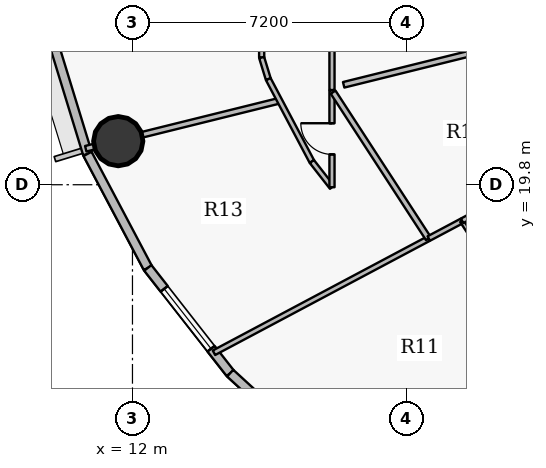
"""IFC4 building model, lengths in metres.
Left out: names, types, materials, properties, quantities, classifications, styles, units other than length and angle.
Written with IfcOpenShell. Run it as: python <this file> out.ifc"""

import sys

from ifc_helpers import new_model, si_unit, direction, frame, frame_2d, origin, origin_2d, place, context, subcontext, project, spatial, rectangle, hollow_circle, extrude, source, transform, mapped, element, fill, save


model = new_model("IFC4")
c1 = context("Model", 3, precision=1e-05, world=origin(), true_north=direction((0.0, 1.0)))
c2 = subcontext(c1, "Body", "Model", "MODEL_VIEW")
j1 = project(units=[si_unit("LENGTHUNIT", "METRE"), si_unit("PLANEANGLEUNIT", "RADIAN")], contexts=[c1])
p1 = place(None, origin())
s1 = spatial("IfcSite", under=j1, at=p1, CompositionType="ELEMENT")
p2 = place(p1, origin())
s2 = spatial("IfcBuilding", under=s1, at=p2, CompositionType="ELEMENT")
p3 = place(p2, frame((0.0, 0.0, 201.15)))
s3 = spatial("IfcBuildingStorey", under=s2, at=p3, CompositionType="ELEMENT", Elevation=201.15)
p4 = place(p3, frame((11.625, 20.947, 0.0), z_axis=(0.0, 0.0, 1.0), x_axis=(1.0, 0.0, 0.0)))
e1 = element("IfcColumn", 1, at=p4, inside=s3, PredefinedType="COLUMN", context=c2, shape_type="SweptSolid", body=[
    extrude(hollow_circle(Radius=0.65, WallThickness=0.04, at=origin_2d()), origin(), (0.0, 0.0, 1.0), 3.75),
])
p5 = place(p3, frame((10.817, 20.611, 0.0), z_axis=(0.0, 0.0, 1.0), x_axis=(-0.293097995113, 0.956082405058, 0.0)))
e2 = element("IfcWall", 2, at=p5, inside=s3, PredefinedType="SOLIDWALL", context=c2, shape_type="SweptSolid", body=[
    extrude(rectangle(XDim=3.3, YDim=0.24, at=frame_2d((1.65, 0.0))), origin(), (0.0, 0.0, 1.0), 3.45),
])
p6 = place(p3, frame((12.404, 17.612, 0.0), z_axis=(0.0, 0.0, 1.0), x_axis=(-0.467586874938, 0.88394712194, 0.0)))
e3 = element("IfcWall", 3, at=p6, inside=s3, PredefinedType="SOLIDWALL", context=c2, shape_type="SweptSolid", body=[
    extrude(rectangle(XDim=3.393, YDim=0.24, at=frame_2d((1.697, 0.0))), origin(), (0.0, 0.0, 1.0), 3.45),
])
p7 = place(p3, frame((14.572, 14.842, 0.0), z_axis=(0.0, 0.0, 1.0), x_axis=(-0.616287674549, 0.787521112224, 0.0)))
e4 = element("IfcWall", 4, at=p7, inside=s3, PredefinedType="SOLIDWALL", context=c2, shape_type="SweptSolid", body=[
    extrude(rectangle(XDim=3.517, YDim=0.24, at=frame_2d((1.759, 0.0))), origin(), (0.0, 0.0, 1.0), 3.45),
])
p8 = place(p7, frame((0.819, 0.0, 0.9)))
e5 = element("IfcOpeningElement", 5, at=p8, cuts=e4, PredefinedType="OPENING", context=c2, shape_type="SweptSolid", body=[
    extrude(rectangle(XDim=2.0, YDim=1.75, at=origin_2d()), frame((1.0, 0.13, 0.875), z_axis=(0.0, -1.0, 0.0), x_axis=(1.0, 0.0, 0.0)), (0.0, 0.0, 1.0), 0.26),
])
p9 = place(p3, frame((17.268, 12.369, 0.0), z_axis=(0.0, 0.0, 1.0), x_axis=(-0.737076565834, 0.675809245349, 0.0)))
e6 = element("IfcWall", 6, at=p9, inside=s3, PredefinedType="SOLIDWALL", context=c2, shape_type="SweptSolid", body=[
    extrude(rectangle(XDim=3.658, YDim=0.24, at=frame_2d((1.829, 0.0))), origin(), (0.0, 0.0, 1.0), 3.45),
])
p10 = place(p9, frame((1.204, 0.0, 0.9)))
e7 = element("IfcOpeningElement", 7, at=p10, cuts=e6, PredefinedType="OPENING", context=c2, shape_type="SweptSolid", body=[
    extrude(rectangle(XDim=1.25, YDim=1.65, at=origin_2d()), frame((0.625, 0.13, 0.825), z_axis=(0.0, -1.0, 0.0), x_axis=(1.0, 0.0, 0.0)), (0.0, 0.0, 1.0), 0.26),
])
p11 = place(p3, frame((10.771, 20.747, 0.0), z_axis=(0.0, 0.0, 1.0), x_axis=(0.970640303721, 0.240535653891, 0.0)))
e8 = element("IfcWall", 8, at=p11, inside=s3, PredefinedType="PARTITIONING", context=c2, shape_type="SweptSolid", body=[
    extrude(rectangle(XDim=5.258, YDim=0.15, at=frame_2d((2.629, 0.0))), origin(), (0.0, 0.0, 1.0), 2.885),
])
p12 = place(p3, frame((14.145, 15.379, 0.0), z_axis=(0.0, 0.0, 1.0), x_axis=(0.882932689309, 0.469499591214, 0.0)))
e9 = element("IfcWall", 9, at=p12, inside=s3, PredefinedType="PARTITIONING", context=c2, shape_type="SweptSolid", body=[
    extrude(rectangle(XDim=6.392, YDim=0.135, at=frame_2d((3.196, 0.0))), origin(), (0.0, 0.0, 1.0), 2.885),
])
p13 = place(p3, frame((15.4, 23.146, 0.0), z_axis=(0.0, 0.0, 1.0), x_axis=(0.0, 1.0, 0.0)))
e10 = element("IfcWall", 10, at=p13, inside=s3, PredefinedType="PARTITIONING", context=c2, shape_type="SweptSolid", body=[
    extrude(rectangle(XDim=4.804, YDim=0.135, at=frame_2d((2.402, 0.0))), origin(), (0.0, 0.0, 1.0), 2.885),
])
p14 = place(p3, frame((15.4, 23.146, 0.0), z_axis=(0.0, 0.0, 1.0), x_axis=(0.293335154151, -0.956009669061, 0.0)))
e11 = element("IfcWall", 11, at=p14, inside=s3, PredefinedType="PARTITIONING", context=c2, shape_type="SweptSolid", body=[
    extrude(rectangle(XDim=0.594, YDim=0.135, at=frame_2d((0.297, 0.0))), origin(), (0.0, 0.0, 1.0), 3.45),
])
p15 = place(p3, frame((15.574, 22.578, 0.0), z_axis=(0.0, 0.0, 1.0), x_axis=(0.467530807018, -0.883976778252, 0.0)))
e12 = element("IfcWall", 12, at=p15, inside=s3, PredefinedType="PARTITIONING", context=c2, shape_type="SweptSolid", body=[
    extrude(rectangle(XDim=2.452, YDim=0.135, at=frame_2d((1.226, 0.0))), origin(), (0.0, 0.0, 1.0), 2.885),
])
p16 = place(p3, frame((16.72, 20.411, 0.0), z_axis=(0.0, 0.0, 1.0), x_axis=(0.616377221056, -0.787451027914, 0.0)))
e13 = element("IfcWall", 13, at=p16, inside=s3, PredefinedType="PARTITIONING", context=c2, shape_type="SweptSolid", body=[
    extrude(rectangle(XDim=0.859, YDim=0.135, at=frame_2d((0.43, 0.0))), origin(), (0.0, 0.0, 1.0), 3.45),
])
p17 = place(p3, frame((17.25, 19.734, 0.0), z_axis=(0.0, 0.0, 1.0), x_axis=(0.0, 1.0, 0.0)))
e14 = element("IfcWall", 14, at=p17, inside=s3, PredefinedType="PARTITIONING", context=c2, shape_type="SweptSolid", body=[
    extrude(rectangle(XDim=2.548, YDim=0.135, at=frame_2d((1.274, 0.0))), origin(), (0.0, 0.0, 1.0), 2.885),
])
p18 = place(p17, frame((0.864, 0.0, 0.0)))
e15 = element("IfcOpeningElement", 15, at=p18, cuts=e14, PredefinedType="OPENING", context=c2, shape_type="SweptSolid", body=[
    extrude(rectangle(XDim=0.82, YDim=2.1, at=origin_2d()), frame((0.41, 0.078, 1.05), z_axis=(0.0, -1.0, 0.0), x_axis=(1.0, 0.0, 0.0)), (0.0, 0.0, 1.0), 0.155),
])
p19 = place(p3, frame((17.279, 22.237, 0.0), z_axis=(0.0, 0.0, 1.0), x_axis=(0.545383699519, -0.83818650687, 0.0)))
e16 = element("IfcWall", 16, at=p19, inside=s3, PredefinedType="PARTITIONING", context=c2, shape_type="SweptSolid", body=[
    extrude(rectangle(XDim=4.601, YDim=0.15, at=frame_2d((2.3, 0.0))), origin(), (0.0, 0.0, 1.0), 2.885),
])
p20 = place(p3, frame((18.899, 11.272, 0.0), z_axis=(0.0, 0.0, 1.0), x_axis=(0.736047362481, 0.676930040834, 0.0)))
e17 = element("IfcWall", 17, at=p20, inside=s3, PredefinedType="PARTITIONING", context=c2, shape_type="SweptSolid", body=[
    extrude(rectangle(XDim=6.983, YDim=0.1, at=frame_2d((3.492, 0.0))), origin(), (0.0, 0.0, 1.0), 2.885),
])
p21 = place(p3, frame((19.798, 18.385, 0.0), z_axis=(0.0, 0.0, 1.0), x_axis=(0.882964446326, 0.469439864652, 0.0)))
e18 = element("IfcWall", 18, at=p21, inside=s3, PredefinedType="PARTITIONING", context=c2, shape_type="SweptSolid", body=[
    extrude(rectangle(XDim=0.982, YDim=0.135, at=frame_2d((0.491, 0.0))), origin(), (0.0, 0.0, 1.0), 3.45),
])
p22 = place(p3, frame((20.665, 18.846, 0.0), z_axis=(0.0, 0.0, 1.0), x_axis=(0.545143704476, -0.838342615802, 0.0)))
e19 = element("IfcWall", 19, at=p22, inside=s3, PredefinedType="PARTITIONING", context=c2, shape_type="SweptSolid", body=[
    extrude(rectangle(XDim=0.497, YDim=0.1, at=frame_2d((0.249, 0.0))), origin(), (0.0, 0.0, 1.0), 3.45),
])
p23 = place(p3, frame((20.674, 18.851, 0.0), z_axis=(0.0, 0.0, 1.0), x_axis=(0.882934968765, 0.469495304483, 0.0)))
e20 = element("IfcWall", 20, at=p23, inside=s3, PredefinedType="PARTITIONING", context=c2, shape_type="SweptSolid", body=[
    extrude(rectangle(XDim=4.164, YDim=0.135, at=frame_2d((2.082, 0.0))), origin(), (0.0, 0.0, 1.0), 3.45),
])
p24 = place(p3, frame((17.25, 26.05, 0.0), z_axis=(0.0, 0.0, 1.0), x_axis=(0.0, -1.0, 0.0)))
e21 = element("IfcWall", 21, at=p24, inside=s3, PredefinedType="PARTITIONING", context=c2, shape_type="SweptSolid", body=[
    extrude(rectangle(XDim=3.758, YDim=0.135, at=frame_2d((1.879, 0.0))), origin(), (0.0, 0.0, 1.0), 2.885),
])
p25 = place(p3, frame((17.558, 22.429, 0.0), z_axis=(0.0, 0.0, 1.0), x_axis=(0.970632119323, 0.240568678214, 0.0)))
e22 = element("IfcWall", 22, at=p25, inside=s3, PredefinedType="PARTITIONING", context=c2, shape_type="SweptSolid", body=[
    extrude(rectangle(XDim=6.66, YDim=0.15, at=frame_2d((3.33, 0.0))), origin(), (0.0, 0.0, 1.0), 2.885),
])
m1 = source(origin(), c2, "Body", "SweptSolid", [
    extrude(rectangle(XDim=2.0, YDim=1.75, at=origin_2d()), frame((1.0, 0.03, 0.875), z_axis=(0.0, -1.0, 0.0), x_axis=(1.0, 0.0, 0.0)), (0.0, 0.0, 1.0), 0.06),
])
p26 = place(p8, origin())
e23 = element("IfcWindow", 23, at=p26, inside=s3, PartitioningType="DOUBLE_PANEL_VERTICAL", PredefinedType="WINDOW", context=c2, shape_type="MappedRepresentation", body=[
    mapped(m1, transform((0.0, 0.0, 0.0), x_axis=(1.0, 0.0, 0.0), y_axis=(0.0, 1.0, 0.0), z_axis=(0.0, 0.0, 1.0), scale=1.0)),
])
fill(e5, e23)
m2 = source(origin(), c2, "Body", "SweptSolid", [
    extrude(rectangle(XDim=0.82, YDim=2.1, at=origin_2d()), frame((0.41, 0.025, 1.05), z_axis=(0.0, -1.0, 0.0), x_axis=(1.0, 0.0, 0.0)), (0.0, 0.0, 1.0), 0.05),
])
p27 = place(p18, origin())
e24 = element("IfcDoor", 24, at=p27, inside=s3, OperationType="SINGLE_SWING_RIGHT", PredefinedType="DOOR", context=c2, shape_type="MappedRepresentation", body=[
    mapped(m2, transform((0.0, 0.0, 0.0), x_axis=(1.0, 0.0, 0.0), y_axis=(0.0, 1.0, 0.0), z_axis=(0.0, 0.0, 1.0), scale=1.0)),
])
fill(e15, e24)
save(model, sys.argv[1])
